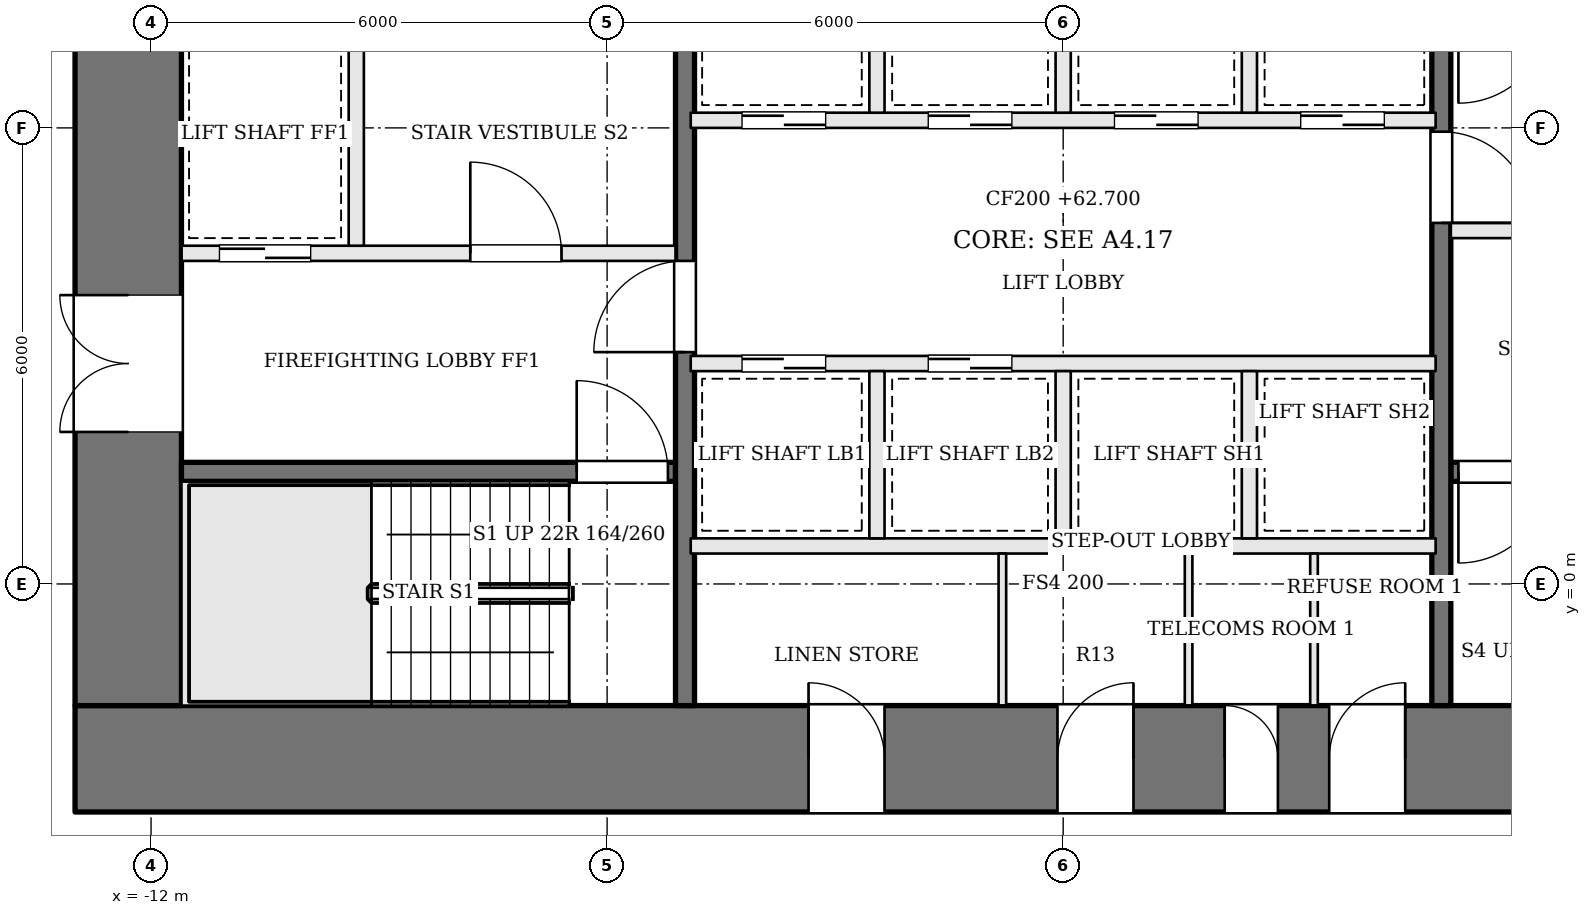
"""IFC4 building model, lengths in metres.
Left out: names, types, materials, properties, quantities, classifications, styles, units other than length and angle.
Written with IfcOpenShell. Run it as: python <this file> out.ifc"""

import sys

from ifc_helpers import new_model, si_unit, direction, frame, frame_2d, origin, place, context, subcontext, project, spatial, rectangle, extrude, element, fill, save


model = new_model("IFC4")
c1 = context("Model", 3, precision=1e-05, world=origin(), true_north=direction((0.0, 1.0)))
c2 = subcontext(c1, "Body", "Model", "MODEL_VIEW")
j1 = project(units=[si_unit("LENGTHUNIT", "METRE"), si_unit("PLANEANGLEUNIT", "RADIAN")], contexts=[c1])
p1 = place(None, origin())
s1 = spatial("IfcSite", under=j1, at=p1, CompositionType="ELEMENT")
p2 = place(p1, origin())
s2 = spatial("IfcBuilding", under=s1, at=p2, CompositionType="ELEMENT")
p3 = place(p2, frame((0.0, 0.0, 62.7)))
s3 = spatial("IfcBuildingStorey", under=s2, at=p3, CompositionType="ELEMENT", Elevation=62.7)
p4 = place(p3, frame((-13.0, -2.3, 0.0), z_axis=(0.0, 0.0, 1.0), x_axis=(1.0, 0.0, 0.0)))
e1 = element("IfcWall", 1, at=p4, inside=s3, PredefinedType="SHEAR", context=c2, shape_type="SweptSolid", body=[
    extrude(rectangle(XDim=26.0, YDim=1.4, at=frame_2d((13.0, 0.0))), origin(), (0.0, 0.0, 1.0), 3.6),
])
p5 = place(p4, frame((9.65, 0.0, 0.0)))
e2 = element("IfcOpeningElement", 2, at=p5, cuts=e1, PredefinedType="OPENING", context=c2, shape_type="SweptSolid", body=[
    extrude(rectangle(XDim=1.0, YDim=2.1, at=frame_2d((0.5, 1.05))), frame((0.0, 0.71, 0.0), z_axis=(0.0, -1.0, 0.0), x_axis=(1.0, 0.0, 0.0)), (0.0, 0.0, 1.0), 1.42),
])
p6 = place(p4, frame((12.925, 0.0, 0.0)))
e3 = element("IfcOpeningElement", 3, at=p6, cuts=e1, PredefinedType="OPENING", context=c2, shape_type="SweptSolid", body=[
    extrude(rectangle(XDim=1.0, YDim=2.1, at=frame_2d((0.5, 1.05))), frame((0.0, 0.71, 0.0), z_axis=(0.0, -1.0, 0.0), x_axis=(1.0, 0.0, 0.0)), (0.0, 0.0, 1.0), 1.42),
])
p7 = place(p4, frame((15.125, 0.0, 0.0)))
e4 = element("IfcOpeningElement", 4, at=p7, cuts=e1, PredefinedType="OPENING", context=c2, shape_type="SweptSolid", body=[
    extrude(rectangle(XDim=0.7, YDim=2.1, at=frame_2d((0.35, 1.05))), frame((0.0, 0.71, 0.0), z_axis=(0.0, -1.0, 0.0), x_axis=(1.0, 0.0, 0.0)), (0.0, 0.0, 1.0), 1.42),
])
p8 = place(p4, frame((16.5, 0.0, 0.0)))
e5 = element("IfcOpeningElement", 5, at=p8, cuts=e1, PredefinedType="OPENING", context=c2, shape_type="SweptSolid", body=[
    extrude(rectangle(XDim=1.0, YDim=2.1, at=frame_2d((0.5, 1.05))), frame((0.0, 0.71, 0.0), z_axis=(0.0, -1.0, 0.0), x_axis=(1.0, 0.0, 0.0)), (0.0, 0.0, 1.0), 1.42),
])
p9 = place(p3, frame((-12.3, -1.6, 0.0), z_axis=(0.0, 0.0, 1.0), x_axis=(0.0, 1.0, 0.0)))
e6 = element("IfcWall", 6, at=p9, inside=s3, PredefinedType="SHEAR", context=c2, shape_type="SweptSolid", body=[
    extrude(rectangle(XDim=12.2, YDim=1.4, at=frame_2d((6.1, 0.0))), origin(), (0.0, 0.0, 1.0), 3.6),
])
p10 = place(p9, frame((3.6, 0.0, 0.0)))
e7 = element("IfcOpeningElement", 7, at=p10, cuts=e6, PredefinedType="OPENING", context=c2, shape_type="SweptSolid", body=[
    extrude(rectangle(XDim=1.8, YDim=2.1, at=frame_2d((0.9, 1.05))), frame((0.0, 0.71, 0.0), z_axis=(0.0, -1.0, 0.0), x_axis=(1.0, 0.0, 0.0)), (0.0, 0.0, 1.0), 1.42),
])
p11 = place(p3, frame((-11.6, 1.475, 0.0), z_axis=(0.0, 0.0, 1.0), x_axis=(1.0, 0.0, 0.0)))
e8 = element("IfcWall", 8, at=p11, inside=s3, PredefinedType="SOLIDWALL", context=c2, shape_type="SweptSolid", body=[
    extrude(rectangle(XDim=6.5, YDim=0.25, at=frame_2d((3.25, 0.0))), origin(), (0.0, 0.0, 1.0), 3.4),
])
p12 = place(p11, frame((5.2, 0.0, 0.0)))
e9 = element("IfcOpeningElement", 9, at=p12, cuts=e8, PredefinedType="OPENING", context=c2, shape_type="SweptSolid", body=[
    extrude(rectangle(XDim=1.2, YDim=2.1, at=frame_2d((0.6, 1.05))), frame((0.0, 0.135, 0.0), z_axis=(0.0, -1.0, 0.0), x_axis=(1.0, 0.0, 0.0)), (0.0, 0.0, 1.0), 0.27),
])
p13 = place(p3, frame((-11.6, 4.35, 0.0), z_axis=(0.0, 0.0, 1.0), x_axis=(1.0, 0.0, 0.0)))
e10 = element("IfcWall", 10, at=p13, inside=s3, PredefinedType="SOLIDWALL", context=c2, shape_type="SweptSolid", body=[
    extrude(rectangle(XDim=6.5, YDim=0.2, at=frame_2d((3.25, 0.0))), origin(), (0.0, 0.0, 1.0), 3.4),
])
p14 = place(p13, frame((3.8, 0.0, 0.0)))
e11 = element("IfcOpeningElement", 11, at=p14, cuts=e10, PredefinedType="OPENING", context=c2, shape_type="SweptSolid", body=[
    extrude(rectangle(XDim=1.2, YDim=2.1, at=frame_2d((0.6, 1.05))), frame((0.0, 0.11, 0.0), z_axis=(0.0, -1.0, 0.0), x_axis=(1.0, 0.0, 0.0)), (0.0, 0.0, 1.0), 0.22),
])
p15 = place(p13, frame((0.5, 0.0, 0.0)))
e12 = element("IfcOpeningElement", 12, at=p15, cuts=e10, PredefinedType="OPENING", context=c2, shape_type="SweptSolid", body=[
    extrude(rectangle(XDim=1.2, YDim=2.1, at=frame_2d((0.6, 1.05))), frame((0.0, 0.11, 0.0), z_axis=(0.0, -1.0, 0.0), x_axis=(1.0, 0.0, 0.0)), (0.0, 0.0, 1.0), 0.22),
])
p16 = place(p3, frame((11.6, 4.65, 0.0), z_axis=(0.0, 0.0, 1.0), x_axis=(-1.0, 0.0, 0.0)))
e13 = element("IfcWall", 13, at=p16, inside=s3, PredefinedType="SOLIDWALL", context=c2, shape_type="SweptSolid", body=[
    extrude(rectangle(XDim=6.5, YDim=0.2, at=frame_2d((3.25, 0.0))), origin(), (0.0, 0.0, 1.0), 3.4),
])
p17 = place(p16, frame((3.8, 0.0, 0.0)))
e14 = element("IfcOpeningElement", 14, at=p17, cuts=e13, PredefinedType="OPENING", context=c2, shape_type="SweptSolid", body=[
    extrude(rectangle(XDim=1.2, YDim=2.1, at=frame_2d((0.6, 1.05))), frame((0.0, 0.11, 0.0), z_axis=(0.0, -1.0, 0.0), x_axis=(1.0, 0.0, 0.0)), (0.0, 0.0, 1.0), 0.22),
])
p18 = place(p16, frame((0.5, 0.0, 0.0)))
e15 = element("IfcOpeningElement", 15, at=p18, cuts=e13, PredefinedType="OPENING", context=c2, shape_type="SweptSolid", body=[
    extrude(rectangle(XDim=1.2, YDim=2.1, at=frame_2d((0.6, 1.05))), frame((0.0, 0.11, 0.0), z_axis=(0.0, -1.0, 0.0), x_axis=(1.0, 0.0, 0.0)), (0.0, 0.0, 1.0), 0.22),
])
p19 = place(p3, frame((11.6, 1.475, 0.0), z_axis=(0.0, 0.0, 1.0), x_axis=(-1.0, 0.0, 0.0)))
e16 = element("IfcWall", 16, at=p19, inside=s3, PredefinedType="SOLIDWALL", context=c2, shape_type="SweptSolid", body=[
    extrude(rectangle(XDim=6.5, YDim=0.25, at=frame_2d((3.25, 0.0))), origin(), (0.0, 0.0, 1.0), 3.4),
])
p20 = place(p19, frame((5.2, 0.0, 0.0)))
e17 = element("IfcOpeningElement", 17, at=p20, cuts=e16, PredefinedType="OPENING", context=c2, shape_type="SweptSolid", body=[
    extrude(rectangle(XDim=1.2, YDim=2.1, at=frame_2d((0.6, 1.05))), frame((0.0, 0.135, 0.0), z_axis=(0.0, -1.0, 0.0), x_axis=(1.0, 0.0, 0.0)), (0.0, 0.0, 1.0), 0.27),
])
p21 = place(p3, frame((-9.3, 4.45, 0.0), z_axis=(0.0, 0.0, 1.0), x_axis=(0.0, 1.0, 0.0)))
e18 = element("IfcWall", 18, at=p21, inside=s3, PredefinedType="SOLIDWALL", context=c2, shape_type="SweptSolid", body=[
    extrude(rectangle(XDim=3.0, YDim=0.2, at=frame_2d((1.5, 0.0))), origin(), (0.0, 0.0, 1.0), 3.4),
])
p22 = place(p3, frame((-4.975, -1.6, 0.0), z_axis=(0.0, 0.0, 1.0), x_axis=(0.0, 1.0, 0.0)))
e19 = element("IfcWall", 19, at=p22, inside=s3, PredefinedType="SOLIDWALL", context=c2, shape_type="SweptSolid", body=[
    extrude(rectangle(XDim=12.2, YDim=0.25, at=frame_2d((6.1, 0.0))), origin(), (0.0, 0.0, 1.0), 3.4),
])
p23 = place(p22, frame((4.65, 0.0, 0.0)))
e20 = element("IfcOpeningElement", 20, at=p23, cuts=e19, PredefinedType="OPENING", context=c2, shape_type="SweptSolid", body=[
    extrude(rectangle(XDim=1.2, YDim=2.1, at=frame_2d((0.6, 1.05))), frame((0.0, 0.135, 0.0), z_axis=(0.0, -1.0, 0.0), x_axis=(1.0, 0.0, 0.0)), (0.0, 0.0, 1.0), 0.27),
])
p24 = place(p3, frame((4.975, 10.6, 0.0), z_axis=(0.0, 0.0, 1.0), x_axis=(0.0, -1.0, 0.0)))
e21 = element("IfcWall", 21, at=p24, inside=s3, PredefinedType="SOLIDWALL", context=c2, shape_type="SweptSolid", body=[
    extrude(rectangle(XDim=12.2, YDim=0.25, at=frame_2d((6.1, 0.0))), origin(), (0.0, 0.0, 1.0), 3.4),
])
p25 = place(p24, frame((4.65, 0.0, 0.0)))
e22 = element("IfcOpeningElement", 22, at=p25, cuts=e21, PredefinedType="OPENING", context=c2, shape_type="SweptSolid", body=[
    extrude(rectangle(XDim=1.2, YDim=2.1, at=frame_2d((0.6, 1.05))), frame((0.0, 0.135, 0.0), z_axis=(0.0, -1.0, 0.0), x_axis=(1.0, 0.0, 0.0)), (0.0, 0.0, 1.0), 0.27),
])
p26 = place(p3, frame((-4.9, 0.5, 0.0), z_axis=(0.0, 0.0, 1.0), x_axis=(1.0, 0.0, 0.0)))
e23 = element("IfcWall", 23, at=p26, inside=s3, PredefinedType="SOLIDWALL", context=c2, shape_type="SweptSolid", body=[
    extrude(rectangle(XDim=9.8, YDim=0.2, at=frame_2d((4.9, 0.0))), origin(), (0.0, 0.0, 1.0), 3.4),
])
p27 = place(p3, frame((-4.9, 2.9, 0.0), z_axis=(0.0, 0.0, 1.0), x_axis=(1.0, 0.0, 0.0)))
e24 = element("IfcWall", 24, at=p27, inside=s3, PredefinedType="SOLIDWALL", context=c2, shape_type="SweptSolid", body=[
    extrude(rectangle(XDim=9.8, YDim=0.2, at=frame_2d((4.9, 0.0))), origin(), (0.0, 0.0, 1.0), 3.4),
])
p28 = place(p27, frame((0.675, 0.0, 0.0)))
e25 = element("IfcOpeningElement", 25, at=p28, cuts=e24, PredefinedType="OPENING", context=c2, shape_type="SweptSolid", body=[
    extrude(rectangle(XDim=1.1, YDim=2.1, at=frame_2d((0.55, 1.05))), frame((0.0, 0.11, 0.0), z_axis=(0.0, -1.0, 0.0), x_axis=(1.0, 0.0, 0.0)), (0.0, 0.0, 1.0), 0.22),
])
p29 = place(p27, frame((3.125, 0.0, 0.0)))
e26 = element("IfcOpeningElement", 26, at=p29, cuts=e24, PredefinedType="OPENING", context=c2, shape_type="SweptSolid", body=[
    extrude(rectangle(XDim=1.1, YDim=2.1, at=frame_2d((0.55, 1.05))), frame((0.0, 0.11, 0.0), z_axis=(0.0, -1.0, 0.0), x_axis=(1.0, 0.0, 0.0)), (0.0, 0.0, 1.0), 0.22),
])
p30 = place(p3, frame((-4.9, 6.1, 0.0), z_axis=(0.0, 0.0, 1.0), x_axis=(1.0, 0.0, 0.0)))
e27 = element("IfcWall", 27, at=p30, inside=s3, PredefinedType="SOLIDWALL", context=c2, shape_type="SweptSolid", body=[
    extrude(rectangle(XDim=9.8, YDim=0.2, at=frame_2d((4.9, 0.0))), origin(), (0.0, 0.0, 1.0), 3.4),
])
p31 = place(p30, frame((0.675, 0.0, 0.0)))
e28 = element("IfcOpeningElement", 28, at=p31, cuts=e27, PredefinedType="OPENING", context=c2, shape_type="SweptSolid", body=[
    extrude(rectangle(XDim=1.1, YDim=2.1, at=frame_2d((0.55, 1.05))), frame((0.0, 0.11, 0.0), z_axis=(0.0, -1.0, 0.0), x_axis=(1.0, 0.0, 0.0)), (0.0, 0.0, 1.0), 0.22),
])
p32 = place(p30, frame((3.125, 0.0, 0.0)))
e29 = element("IfcOpeningElement", 29, at=p32, cuts=e27, PredefinedType="OPENING", context=c2, shape_type="SweptSolid", body=[
    extrude(rectangle(XDim=1.1, YDim=2.1, at=frame_2d((0.55, 1.05))), frame((0.0, 0.11, 0.0), z_axis=(0.0, -1.0, 0.0), x_axis=(1.0, 0.0, 0.0)), (0.0, 0.0, 1.0), 0.22),
])
p33 = place(p30, frame((5.575, 0.0, 0.0)))
e30 = element("IfcOpeningElement", 30, at=p33, cuts=e27, PredefinedType="OPENING", context=c2, shape_type="SweptSolid", body=[
    extrude(rectangle(XDim=1.1, YDim=2.1, at=frame_2d((0.55, 1.05))), frame((0.0, 0.11, 0.0), z_axis=(0.0, -1.0, 0.0), x_axis=(1.0, 0.0, 0.0)), (0.0, 0.0, 1.0), 0.22),
])
p34 = place(p30, frame((8.025, 0.0, 0.0)))
e31 = element("IfcOpeningElement", 31, at=p34, cuts=e27, PredefinedType="OPENING", context=c2, shape_type="SweptSolid", body=[
    extrude(rectangle(XDim=1.1, YDim=2.1, at=frame_2d((0.55, 1.05))), frame((0.0, 0.11, 0.0), z_axis=(0.0, -1.0, 0.0), x_axis=(1.0, 0.0, 0.0)), (0.0, 0.0, 1.0), 0.22),
])
for number, where, z_axis, x_axis in (
    (32, (-2.45, 0.6, 0.0), (0.0, 0.0, 1.0), (0.0, 1.0, 0.0)),
    (33, (0.0, 0.6, 0.0), (0.0, 0.0, 1.0), (0.0, 1.0, 0.0)),
    (34, (2.45, 0.6, 0.0), (0.0, 0.0, 1.0), (0.0, 1.0, 0.0)),
    (35, (-2.45, 6.2, 0.0), (0.0, 0.0, 1.0), (0.0, 1.0, 0.0)),
    (36, (0.0, 6.2, 0.0), (0.0, 0.0, 1.0), (0.0, 1.0, 0.0)),
    (37, (2.45, 6.2, 0.0), (0.0, 0.0, 1.0), (0.0, 1.0, 0.0)),
):
    element("IfcWall", number, at=place(p3, frame(where, z_axis=z_axis, x_axis=x_axis)), inside=s3, PredefinedType="SOLIDWALL", context=c2, shape_type="SweptSolid", body=[
        extrude(rectangle(XDim=2.2, YDim=0.2, at=frame_2d((1.1, 0.0))), origin(), (0.0, 0.0, 1.0), 3.4),
    ])
for number, where, z_axis, x_axis in (
    (38, (-0.8, -1.6, 0.0), (0.0, 0.0, 1.0), (0.0, 1.0, 0.0)),
    (39, (1.65, -1.6, 0.0), (0.0, 0.0, 1.0), (0.0, 1.0, 0.0)),
    (40, (3.3, -1.6, 0.0), (0.0, 0.0, 1.0), (0.0, 1.0, 0.0)),
):
    element("IfcWall", number, at=place(p3, frame(where, z_axis=z_axis, x_axis=x_axis)), inside=s3, PredefinedType="PARTITIONING", context=c2, shape_type="SweptSolid", body=[
        extrude(rectangle(XDim=2.0, YDim=0.1, at=frame_2d((1.0, 0.0))), origin(), (0.0, 0.0, 1.0), 3.4),
    ])
p35 = place(p10, origin())
e41 = element("IfcDoor", 41, at=p35, inside=s3, OperationType="DOUBLE_DOOR_SINGLE_SWING", PredefinedType="DOOR", context=c2, shape_type="SweptSolid", body=[
    extrude(rectangle(XDim=1.8, YDim=2.1, at=frame_2d((0.9, 1.05))), frame((0.0, 0.025, 0.0), z_axis=(0.0, -1.0, 0.0), x_axis=(1.0, 0.0, 0.0)), (0.0, 0.0, 1.0), 0.05),
])
fill(e7, e41)
p36 = place(p23, origin())
e42 = element("IfcDoor", 42, at=p36, inside=s3, OperationType="SINGLE_SWING_LEFT", PredefinedType="DOOR", context=c2, shape_type="SweptSolid", body=[
    extrude(rectangle(XDim=1.2, YDim=2.1, at=frame_2d((0.6, 1.05))), frame((0.0, 0.025, 0.0), z_axis=(0.0, -1.0, 0.0), x_axis=(1.0, 0.0, 0.0)), (0.0, 0.0, 1.0), 0.05),
])
fill(e20, e42)
p37 = place(p25, origin())
e43 = element("IfcDoor", 43, at=p37, inside=s3, OperationType="SINGLE_SWING_RIGHT", PredefinedType="DOOR", context=c2, shape_type="SweptSolid", body=[
    extrude(rectangle(XDim=1.2, YDim=2.1, at=frame_2d((0.6, 1.05))), frame((0.0, 0.025, 0.0), z_axis=(0.0, -1.0, 0.0), x_axis=(1.0, 0.0, 0.0)), (0.0, 0.0, 1.0), 0.05),
])
fill(e22, e43)
p38 = place(p14, origin())
e44 = element("IfcDoor", 44, at=p38, inside=s3, OperationType="SINGLE_SWING_LEFT", PredefinedType="DOOR", context=c2, shape_type="SweptSolid", body=[
    extrude(rectangle(XDim=1.2, YDim=2.1, at=frame_2d((0.6, 1.05))), frame((0.0, 0.025, 0.0), z_axis=(0.0, -1.0, 0.0), x_axis=(1.0, 0.0, 0.0)), (0.0, 0.0, 1.0), 0.05),
])
fill(e11, e44)
p39 = place(p12, origin())
e45 = element("IfcDoor", 45, at=p39, inside=s3, OperationType="SINGLE_SWING_LEFT", PredefinedType="DOOR", context=c2, shape_type="SweptSolid", body=[
    extrude(rectangle(XDim=1.2, YDim=2.1, at=frame_2d((0.6, 1.05))), frame((0.0, 0.025, 0.0), z_axis=(0.0, -1.0, 0.0), x_axis=(1.0, 0.0, 0.0)), (0.0, 0.0, 1.0), 0.05),
])
fill(e9, e45)
p40 = place(p20, origin())
e46 = element("IfcDoor", 46, at=p40, inside=s3, OperationType="SINGLE_SWING_RIGHT", PredefinedType="DOOR", context=c2, shape_type="SweptSolid", body=[
    extrude(rectangle(XDim=1.2, YDim=2.1, at=frame_2d((0.6, 1.05))), frame((0.0, 0.025, 0.0), z_axis=(0.0, -1.0, 0.0), x_axis=(1.0, 0.0, 0.0)), (0.0, 0.0, 1.0), 0.05),
])
fill(e17, e46)
p41 = place(p15, origin())
e47 = element("IfcDoor", 47, at=p41, inside=s3, OperationType="SLIDING_TO_RIGHT", PredefinedType="DOOR", context=c2, shape_type="SweptSolid", body=[
    extrude(rectangle(XDim=1.2, YDim=2.1, at=frame_2d((0.6, 1.05))), frame((0.0, 0.025, 0.0), z_axis=(0.0, -1.0, 0.0), x_axis=(1.0, 0.0, 0.0)), (0.0, 0.0, 1.0), 0.05),
])
fill(e12, e47)
p42 = place(p28, origin())
e48 = element("IfcDoor", 48, at=p42, inside=s3, OperationType="SLIDING_TO_RIGHT", PredefinedType="DOOR", context=c2, shape_type="SweptSolid", body=[
    extrude(rectangle(XDim=1.1, YDim=2.1, at=frame_2d((0.55, 1.05))), frame((0.0, 0.025, 0.0), z_axis=(0.0, -1.0, 0.0), x_axis=(1.0, 0.0, 0.0)), (0.0, 0.0, 1.0), 0.05),
])
fill(e25, e48)
p43 = place(p29, origin())
e49 = element("IfcDoor", 49, at=p43, inside=s3, OperationType="SLIDING_TO_LEFT", PredefinedType="DOOR", context=c2, shape_type="SweptSolid", body=[
    extrude(rectangle(XDim=1.1, YDim=2.1, at=frame_2d((0.55, 1.05))), frame((0.0, 0.025, 0.0), z_axis=(0.0, -1.0, 0.0), x_axis=(1.0, 0.0, 0.0)), (0.0, 0.0, 1.0), 0.05),
])
fill(e26, e49)
p44 = place(p31, origin())
e50 = element("IfcDoor", 50, at=p44, inside=s3, OperationType="SLIDING_TO_RIGHT", PredefinedType="DOOR", context=c2, shape_type="SweptSolid", body=[
    extrude(rectangle(XDim=1.1, YDim=2.1, at=frame_2d((0.55, 1.05))), frame((0.0, 0.025, 0.0), z_axis=(0.0, -1.0, 0.0), x_axis=(1.0, 0.0, 0.0)), (0.0, 0.0, 1.0), 0.05),
])
fill(e28, e50)
p45 = place(p32, origin())
e51 = element("IfcDoor", 51, at=p45, inside=s3, OperationType="SLIDING_TO_LEFT", PredefinedType="DOOR", context=c2, shape_type="SweptSolid", body=[
    extrude(rectangle(XDim=1.1, YDim=2.1, at=frame_2d((0.55, 1.05))), frame((0.0, 0.025, 0.0), z_axis=(0.0, -1.0, 0.0), x_axis=(1.0, 0.0, 0.0)), (0.0, 0.0, 1.0), 0.05),
])
fill(e29, e51)
p46 = place(p33, origin())
e52 = element("IfcDoor", 52, at=p46, inside=s3, OperationType="SLIDING_TO_RIGHT", PredefinedType="DOOR", context=c2, shape_type="SweptSolid", body=[
    extrude(rectangle(XDim=1.1, YDim=2.1, at=frame_2d((0.55, 1.05))), frame((0.0, 0.025, 0.0), z_axis=(0.0, -1.0, 0.0), x_axis=(1.0, 0.0, 0.0)), (0.0, 0.0, 1.0), 0.05),
])
fill(e30, e52)
p47 = place(p34, origin())
e53 = element("IfcDoor", 53, at=p47, inside=s3, OperationType="SLIDING_TO_LEFT", PredefinedType="DOOR", context=c2, shape_type="SweptSolid", body=[
    extrude(rectangle(XDim=1.1, YDim=2.1, at=frame_2d((0.55, 1.05))), frame((0.0, 0.025, 0.0), z_axis=(0.0, -1.0, 0.0), x_axis=(1.0, 0.0, 0.0)), (0.0, 0.0, 1.0), 0.05),
])
fill(e31, e53)
p48 = place(p5, origin())
e54 = element("IfcDoor", 54, at=p48, inside=s3, OperationType="SINGLE_SWING_LEFT", PredefinedType="DOOR", context=c2, shape_type="SweptSolid", body=[
    extrude(rectangle(XDim=1.0, YDim=2.1, at=frame_2d((0.5, 1.05))), frame((0.0, 0.025, 0.0), z_axis=(0.0, -1.0, 0.0), x_axis=(1.0, 0.0, 0.0)), (0.0, 0.0, 1.0), 0.05),
])
fill(e2, e54)
p49 = place(p6, origin())
e55 = element("IfcDoor", 55, at=p49, inside=s3, OperationType="SINGLE_SWING_RIGHT", PredefinedType="DOOR", context=c2, shape_type="SweptSolid", body=[
    extrude(rectangle(XDim=1.0, YDim=2.1, at=frame_2d((0.5, 1.05))), frame((0.0, 0.025, 0.0), z_axis=(0.0, -1.0, 0.0), x_axis=(1.0, 0.0, 0.0)), (0.0, 0.0, 1.0), 0.05),
])
fill(e3, e55)
p50 = place(p7, origin())
e56 = element("IfcDoor", 56, at=p50, inside=s3, OperationType="SINGLE_SWING_LEFT", PredefinedType="DOOR", context=c2, shape_type="SweptSolid", body=[
    extrude(rectangle(XDim=0.7, YDim=2.1, at=frame_2d((0.35, 1.05))), frame((0.0, 0.025, 0.0), z_axis=(0.0, -1.0, 0.0), x_axis=(1.0, 0.0, 0.0)), (0.0, 0.0, 1.0), 0.05),
])
fill(e4, e56)
p51 = place(p8, origin())
e57 = element("IfcDoor", 57, at=p51, inside=s3, OperationType="SINGLE_SWING_RIGHT", PredefinedType="DOOR", context=c2, shape_type="SweptSolid", body=[
    extrude(rectangle(XDim=1.0, YDim=2.1, at=frame_2d((0.5, 1.05))), frame((0.0, 0.025, 0.0), z_axis=(0.0, -1.0, 0.0), x_axis=(1.0, 0.0, 0.0)), (0.0, 0.0, 1.0), 0.05),
])
fill(e5, e57)
save(model, sys.argv[1])
